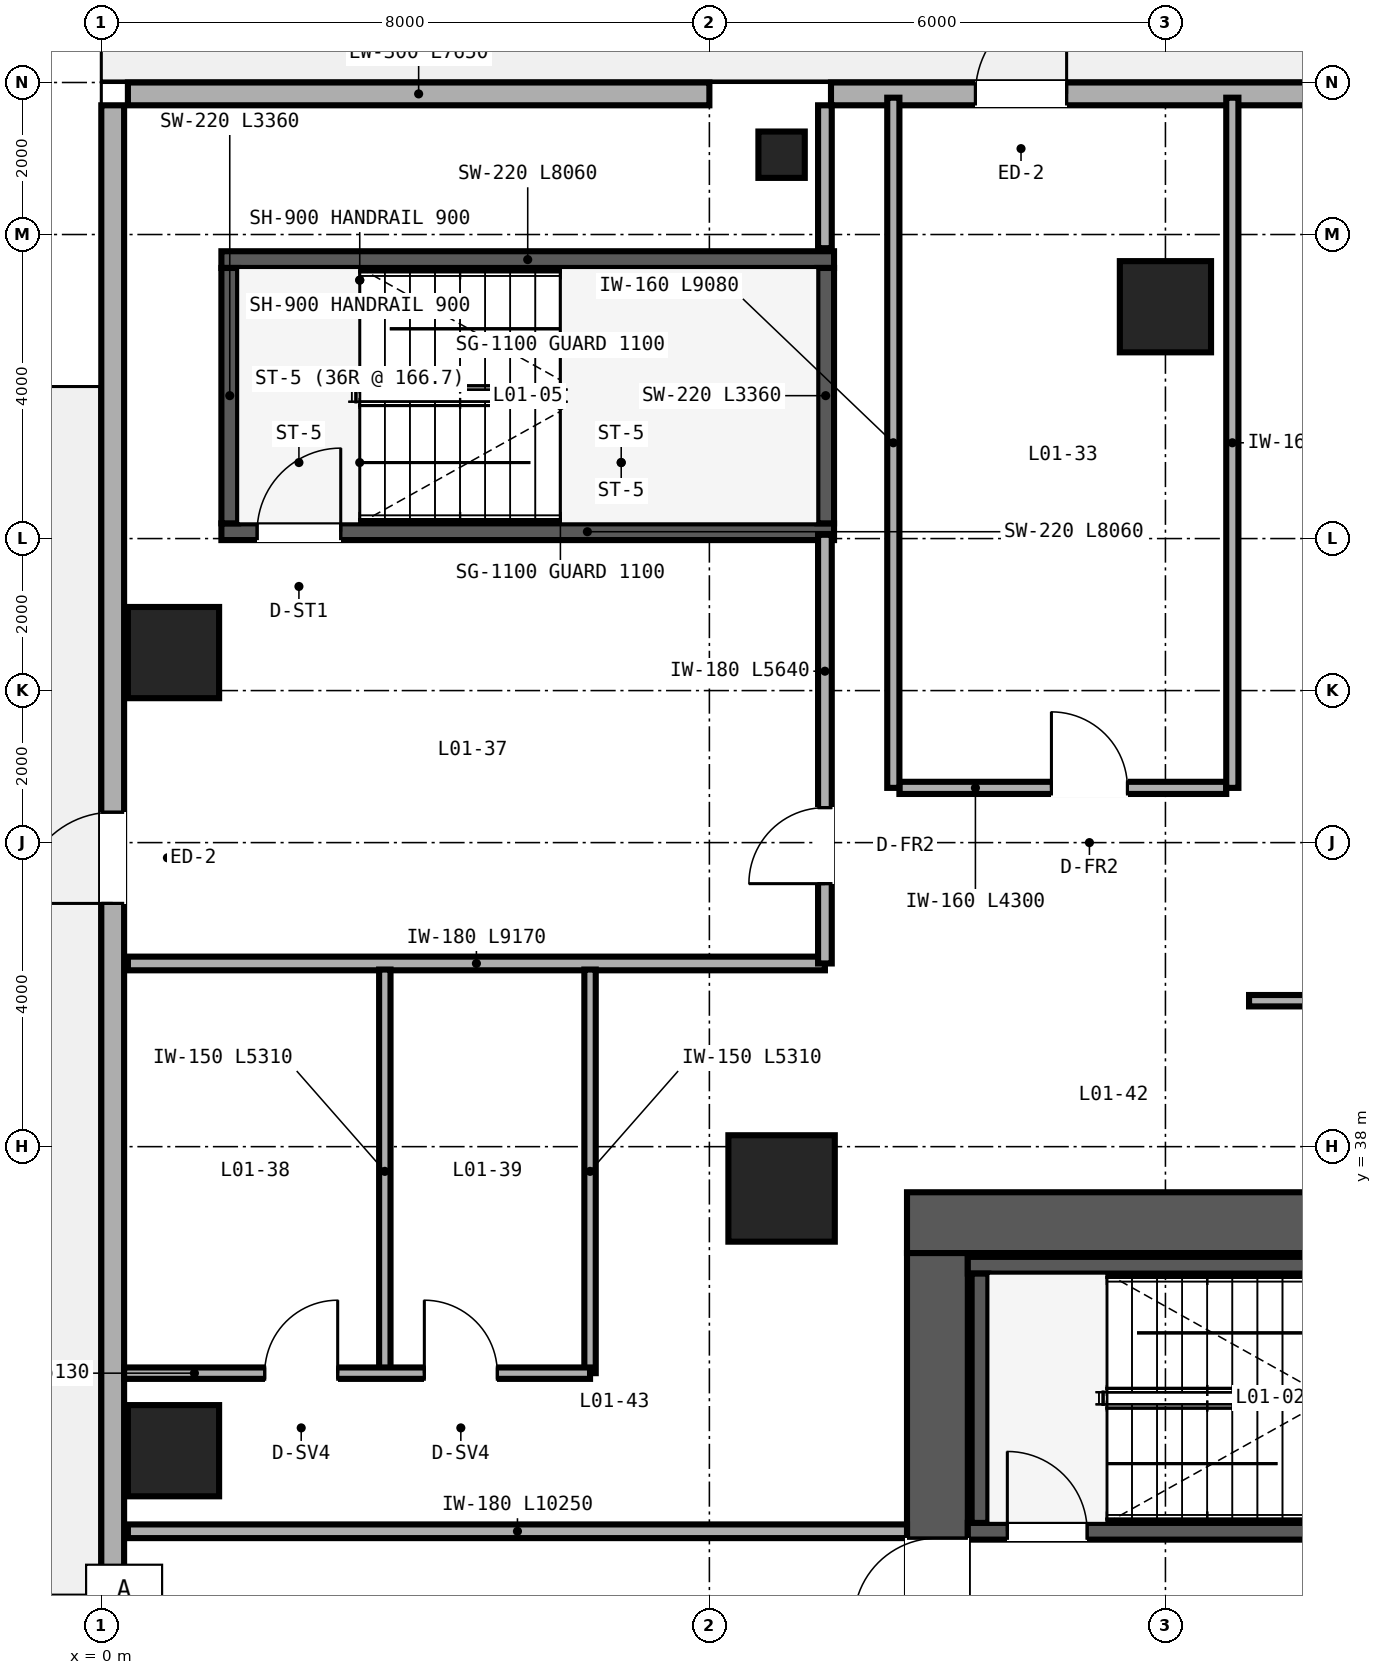
"""IFC4 building model, lengths in metres.
Left out: names, types, materials, properties, quantities, classifications, styles, units other than length and angle.
Written with IfcOpenShell. Run it as: python <this file> out.ifc"""

import sys

from ifc_helpers import new_model, si_unit, direction, frame, frame_2d, origin, origin_2d, place, context, subcontext, project, spatial, rectangle, hollow_circle, extrude, source, transform, mapped, element, fill, save


model = new_model("IFC4")
c1 = context("Model", 3, precision=1e-05, world=origin(), true_north=direction((0.0, 1.0)))
c2 = subcontext(c1, "Body", "Model", "MODEL_VIEW")
j1 = project(units=[si_unit("LENGTHUNIT", "METRE"), si_unit("PLANEANGLEUNIT", "RADIAN")], contexts=[c1])
p1 = place(None, origin())
s1 = spatial("IfcSite", under=j1, at=p1, CompositionType="ELEMENT")
p2 = place(p1, origin())
s2 = spatial("IfcBuilding", under=s1, at=p2, CompositionType="ELEMENT")
p3 = place(p2, origin())
s3 = spatial("IfcBuildingStorey", under=s2, at=p3, CompositionType="ELEMENT", Elevation=0.0)
p4 = place(p3, frame((10.6, 37.0, 0.0), z_axis=(0.0, 0.0, 1.0), x_axis=(1.0, 0.0, 0.0)))
e1 = element("IfcWall", 1, at=p4, inside=s3, PredefinedType="SHEAR", context=c2, shape_type="SweptSolid", body=[
    extrude(rectangle(XDim=12.8, YDim=0.8, at=frame_2d((6.4, 0.0))), origin(), (0.0, 0.0, 1.0), 5.71),
])
p5 = place(p4, frame((8.98, 0.0, 0.0)))
e2 = element("IfcOpeningElement", 2, at=p5, cuts=e1, PredefinedType="OPENING", context=c2, shape_type="SweptSolid", body=[
    extrude(rectangle(XDim=1.0, YDim=2.15, at=frame_2d((0.5, 1.075))), frame((0.0, 0.41, 0.0), z_axis=(0.0, -1.0, 0.0), x_axis=(1.0, 0.0, 0.0)), (0.0, 0.0, 1.0), 0.82),
])
p6 = place(p3, frame((11.0, 15.4, 0.0), z_axis=(0.0, 0.0, 1.0), x_axis=(0.0, 1.0, 0.0)))
e3 = element("IfcWall", 3, at=p6, inside=s3, PredefinedType="SHEAR", context=c2, shape_type="SweptSolid", body=[
    extrude(rectangle(XDim=21.2, YDim=0.8, at=frame_2d((10.6, 0.0))), origin(), (0.0, 0.0, 1.0), 5.71),
])
p7 = place(p6, frame((4.15, 0.0, 0.0)))
e4 = element("IfcOpeningElement", 4, at=p7, cuts=e3, PredefinedType="OPENING", context=c2, shape_type="SweptSolid", body=[
    extrude(rectangle(XDim=1.1, YDim=2.15, at=frame_2d((0.55, 1.075))), frame((0.0, 0.41, 0.0), z_axis=(0.0, -1.0, 0.0), x_axis=(1.0, 0.0, 0.0)), (0.0, 0.0, 1.0), 0.82),
])
p8 = place(p6, frame((16.35, 0.0, 0.0)))
e5 = element("IfcOpeningElement", 5, at=p8, cuts=e3, PredefinedType="OPENING", context=c2, shape_type="SweptSolid", body=[
    extrude(rectangle(XDim=1.1, YDim=2.15, at=frame_2d((0.55, 1.075))), frame((0.0, 0.41, 0.0), z_axis=(0.0, -1.0, 0.0), x_axis=(1.0, 0.0, 0.0)), (0.0, 0.0, 1.0), 0.82),
])
p9 = place(p3, frame((11.4, 32.94, 0.0), z_axis=(0.0, 0.0, 1.0), x_axis=(1.0, 0.0, 0.0)))
e6 = element("IfcWall", 6, at=p9, inside=s3, PredefinedType="SHEAR", context=c2, shape_type="SweptSolid", body=[
    extrude(rectangle(XDim=7.91, YDim=0.22, at=frame_2d((3.955, 0.0))), origin(), (0.0, 0.0, 1.0), 5.8),
])
p10 = place(p9, frame((0.52, 0.0, 0.0)))
e7 = element("IfcOpeningElement", 7, at=p10, cuts=e6, PredefinedType="OPENING", context=c2, shape_type="SweptSolid", body=[
    extrude(rectangle(XDim=1.05, YDim=2.15, at=frame_2d((0.525, 1.075))), frame((0.0, 0.12, 0.0), z_axis=(0.0, -1.0, 0.0), x_axis=(1.0, 0.0, 0.0)), (0.0, 0.0, 1.0), 0.24),
])
p11 = place(p3, frame((11.4, 36.44, 0.0), z_axis=(0.0, 0.0, 1.0), x_axis=(1.0, 0.0, 0.0)))
e8 = element("IfcWall", 8, at=p11, inside=s3, PredefinedType="SHEAR", context=c2, shape_type="SweptSolid", body=[
    extrude(rectangle(XDim=7.91, YDim=0.22, at=frame_2d((3.955, 0.0))), origin(), (0.0, 0.0, 1.0), 5.8),
])
p12 = place(p3, frame((11.56, 33.05, 0.0), z_axis=(0.0, 0.0, 1.0), x_axis=(0.0, 1.0, 0.0)))
e9 = element("IfcWall", 9, at=p12, inside=s3, PredefinedType="SHEAR", context=c2, shape_type="SweptSolid", body=[
    extrude(rectangle(XDim=3.28, YDim=0.22, at=frame_2d((1.64, 0.0))), origin(), (0.0, 0.0, 1.0), 5.8),
])
p13 = place(p3, frame((1.58, 46.09, 0.0), z_axis=(0.0, 0.0, 1.0), x_axis=(1.0, 0.0, 0.0)))
e10 = element("IfcWall", 10, at=p13, inside=s3, PredefinedType="SHEAR", context=c2, shape_type="SweptSolid", body=[
    extrude(rectangle(XDim=8.06, YDim=0.22, at=frame_2d((4.03, 0.0))), origin(), (0.0, 0.0, 1.0), 5.8),
])
p14 = place(p13, frame((0.47, 0.0, 0.0)))
e11 = element("IfcOpeningElement", 11, at=p14, cuts=e10, PredefinedType="OPENING", context=c2, shape_type="SweptSolid", body=[
    extrude(rectangle(XDim=1.1, YDim=2.15, at=frame_2d((0.55, 1.075))), frame((0.0, 0.12, 0.0), z_axis=(0.0, -1.0, 0.0), x_axis=(1.0, 0.0, 0.0)), (0.0, 0.0, 1.0), 0.24),
])
p15 = place(p3, frame((1.58, 49.67, 0.0), z_axis=(0.0, 0.0, 1.0), x_axis=(1.0, 0.0, 0.0)))
e12 = element("IfcWall", 12, at=p15, inside=s3, PredefinedType="SHEAR", context=c2, shape_type="SweptSolid", body=[
    extrude(rectangle(XDim=8.06, YDim=0.22, at=frame_2d((4.03, 0.0))), origin(), (0.0, 0.0, 1.0), 5.8),
])
for number, where, z_axis, x_axis in (
    (13, (1.69, 46.2, 0.0), (0.0, 0.0, 1.0), (0.0, 1.0, 0.0)),
    (14, (9.53, 46.2, 0.0), (0.0, 0.0, 1.0), (0.0, 1.0, 0.0)),
):
    element("IfcWall", number, at=place(p3, frame(where, z_axis=z_axis, x_axis=x_axis)), inside=s3, PredefinedType="SHEAR", context=c2, shape_type="SweptSolid", body=[
        extrude(rectangle(XDim=3.36, YDim=0.22, at=frame_2d((1.68, 0.0))), origin(), (0.0, 0.0, 1.0), 5.8),
    ])
m1 = source(origin(), c2, "Body", "SweptSolid", [
    extrude(rectangle(XDim=1.2, YDim=1.2, at=origin_2d()), origin(), (0.0, 0.0, 1.0), 5.71),
])
for number, where, z_axis, x_axis in (
    (15, (0.95, 34.0, 0.0), (0.0, 0.0, 1.0), (1.0, 0.0, 0.0)),
    (16, (0.95, 44.5, 0.0), (0.0, 0.0, 1.0), (1.0, 0.0, 0.0)),
):
    element("IfcColumn", number, at=place(p3, frame(where, z_axis=z_axis, x_axis=x_axis)), inside=s3, PredefinedType="COLUMN", context=c2, shape_type="MappedRepresentation", body=[
        mapped(m1, transform((0.0, 0.0, 0.0), scale=1.0)),
    ])
m2 = source(origin(), c2, "Body", "SweptSolid", [
    extrude(hollow_circle(Radius=0.305, WallThickness=0.025, at=origin_2d()), origin(), (0.0, 0.0, 1.0), 5.71),
])
p16 = place(p3, frame((8.95, 51.05, 0.0), z_axis=(0.0, 0.0, 1.0), x_axis=(1.0, 0.0, 0.0)))
e17 = element("IfcColumn", 17, at=p16, inside=s3, PredefinedType="COLUMN", context=c2, shape_type="MappedRepresentation", body=[
    mapped(m2, transform((0.0, 0.0, 0.0), scale=1.0)),
])
m3 = source(origin(), c2, "Body", "SweptSolid", [
    extrude(rectangle(XDim=1.4, YDim=1.4, at=origin_2d()), origin(), (0.0, 0.0, 1.0), 5.71),
])
p17 = place(p3, frame((8.95, 37.45, 0.0), z_axis=(0.0, 0.0, 1.0), x_axis=(1.0, 0.0, 0.0)))
e18 = element("IfcColumn", 18, at=p17, inside=s3, PredefinedType="COLUMN", context=c2, shape_type="MappedRepresentation", body=[
    mapped(m3, transform((0.0, 0.0, 0.0), scale=1.0)),
])
p18 = place(p3, frame((14.0, 49.05, 0.0), z_axis=(0.0, 0.0, 1.0), x_axis=(1.0, 0.0, 0.0)))
e19 = element("IfcColumn", 19, at=p18, inside=s3, PredefinedType="COLUMN", context=c2, shape_type="MappedRepresentation", body=[
    mapped(m1, transform((0.0, 0.0, 0.0), scale=1.0)),
])
p19 = place(p3, frame((0.15, 0.3, 0.0), z_axis=(0.0, 0.0, 1.0), x_axis=(0.0, 1.0, 0.0)))
e20 = element("IfcWall", 20, at=p19, inside=s3, PredefinedType="SOLIDWALL", context=c2, shape_type="SweptSolid", body=[
    extrude(rectangle(XDim=51.4, YDim=0.3, at=frame_2d((25.7, 0.0))), origin(), (0.0, 0.0, 1.0), 5.71),
])
p20 = place(p19, frame((19.4, 0.0, 0.0)))
e21 = element("IfcOpeningElement", 21, at=p20, cuts=e20, PredefinedType="OPENING", context=c2, shape_type="SweptSolid", body=[
    extrude(rectangle(XDim=1.2, YDim=2.2, at=frame_2d((0.6, 1.1))), frame((0.0, 0.16, 0.0), z_axis=(0.0, -1.0, 0.0), x_axis=(1.0, 0.0, 0.0)), (0.0, 0.0, 1.0), 0.32),
])
p21 = place(p19, frame((30.6, 0.0, 0.0)))
e22 = element("IfcOpeningElement", 22, at=p21, cuts=e20, PredefinedType="OPENING", context=c2, shape_type="SweptSolid", body=[
    extrude(rectangle(XDim=1.2, YDim=2.2, at=frame_2d((0.6, 1.1))), frame((0.0, 0.16, 0.0), z_axis=(0.0, -1.0, 0.0), x_axis=(1.0, 0.0, 0.0)), (0.0, 0.0, 1.0), 0.32),
])
p22 = place(p19, frame((40.9, 0.0, 0.0)))
e23 = element("IfcOpeningElement", 23, at=p22, cuts=e20, PredefinedType="OPENING", context=c2, shape_type="SweptSolid", body=[
    extrude(rectangle(XDim=1.2, YDim=2.2, at=frame_2d((0.6, 1.1))), frame((0.0, 0.16, 0.0), z_axis=(0.0, -1.0, 0.0), x_axis=(1.0, 0.0, 0.0)), (0.0, 0.0, 1.0), 0.32),
])
p23 = place(p3, frame((0.35, 51.85, 0.0), z_axis=(0.0, 0.0, 1.0), x_axis=(1.0, 0.0, 0.0)))
e24 = element("IfcWall", 24, at=p23, inside=s3, PredefinedType="SOLIDWALL", context=c2, shape_type="SweptSolid", body=[
    extrude(rectangle(XDim=7.65, YDim=0.3, at=frame_2d((3.825, 0.0))), origin(), (0.0, 0.0, 1.0), 5.71),
])
p24 = place(p3, frame((9.6, 51.85, 0.0), z_axis=(0.0, 0.0, 1.0), x_axis=(1.0, 0.0, 0.0)))
e25 = element("IfcWall", 25, at=p24, inside=s3, PredefinedType="SOLIDWALL", context=c2, shape_type="SweptSolid", body=[
    extrude(rectangle(XDim=13.2, YDim=0.3, at=frame_2d((6.6, 0.0))), origin(), (0.0, 0.0, 1.0), 5.71),
])
p25 = place(p24, frame((6.4, 0.0, 0.0)))
e26 = element("IfcOpeningElement", 26, at=p25, cuts=e25, PredefinedType="OPENING", context=c2, shape_type="SweptSolid", body=[
    extrude(rectangle(XDim=2.4, YDim=2.6, at=frame_2d((1.2, 1.3))), frame((0.0, 0.16, 0.0), z_axis=(0.0, -1.0, 0.0), x_axis=(1.0, 0.0, 0.0)), (0.0, 0.0, 1.0), 0.32),
])
p26 = place(p24, frame((1.9, 0.0, 0.0)))
e27 = element("IfcOpeningElement", 27, at=p26, cuts=e25, PredefinedType="OPENING", context=c2, shape_type="SweptSolid", body=[
    extrude(rectangle(XDim=1.2, YDim=2.2, at=frame_2d((0.6, 1.1))), frame((0.0, 0.16, 0.0), z_axis=(0.0, -1.0, 0.0), x_axis=(1.0, 0.0, 0.0)), (0.0, 0.0, 1.0), 0.32),
])
p27 = place(p3, frame((10.5, 42.72, 0.0), z_axis=(0.0, 0.0, 1.0), x_axis=(1.0, 0.0, 0.0)))
e28 = element("IfcWall", 28, at=p27, inside=s3, PredefinedType="PARTITIONING", context=c2, shape_type="SweptSolid", body=[
    extrude(rectangle(XDim=4.3, YDim=0.16, at=frame_2d((2.15, 0.0))), origin(), (0.0, 0.0, 1.0), 5.71),
])
p28 = place(p27, frame((2.0, 0.0, 0.0)))
e29 = element("IfcOpeningElement", 29, at=p28, cuts=e28, PredefinedType="OPENING", context=c2, shape_type="SweptSolid", body=[
    extrude(rectangle(XDim=1.0, YDim=2.15, at=frame_2d((0.5, 1.075))), frame((0.0, 0.09, 0.0), z_axis=(0.0, -1.0, 0.0), x_axis=(1.0, 0.0, 0.0)), (0.0, 0.0, 1.0), 0.18),
])
for number, where, z_axis, x_axis in (
    (30, (10.42, 42.72, 0.0), (0.0, 0.0, 1.0), (0.0, 1.0, 0.0)),
    (31, (14.88, 42.72, 0.0), (0.0, 0.0, 1.0), (0.0, 1.0, 0.0)),
):
    element("IfcWall", number, at=place(p3, frame(where, z_axis=z_axis, x_axis=x_axis)), inside=s3, PredefinedType="PARTITIONING", context=c2, shape_type="SweptSolid", body=[
        extrude(rectangle(XDim=9.08, YDim=0.16, at=frame_2d((4.54, 0.0))), origin(), (0.0, 0.0, 1.0), 4.783),
    ])
p29 = place(p3, frame((15.1, 39.92, 0.0), z_axis=(0.0, 0.0, 1.0), x_axis=(1.0, 0.0, 0.0)))
e32 = element("IfcWall", 32, at=p29, inside=s3, PredefinedType="PARTITIONING", context=c2, shape_type="SweptSolid", body=[
    extrude(rectangle(XDim=4.5, YDim=0.15, at=frame_2d((2.25, 0.0))), origin(), (0.0, 0.0, 1.0), 5.71),
])
p30 = place(p29, frame((1.5, 0.0, 0.0)))
e33 = element("IfcOpeningElement", 33, at=p30, cuts=e32, PredefinedType="OPENING", context=c2, shape_type="SweptSolid", body=[
    extrude(rectangle(XDim=1.1, YDim=2.15, at=frame_2d((0.55, 1.075))), frame((0.0, 0.085, 0.0), z_axis=(0.0, -1.0, 0.0), x_axis=(1.0, 0.0, 0.0)), (0.0, 0.0, 1.0), 0.17),
])
p31 = place(p3, frame((0.35, 32.94, 0.0), z_axis=(0.0, 0.0, 1.0), x_axis=(1.0, 0.0, 0.0)))
e34 = element("IfcWall", 34, at=p31, inside=s3, PredefinedType="SOLIDWALL", context=c2, shape_type="SweptSolid", body=[
    extrude(rectangle(XDim=10.25, YDim=0.18, at=frame_2d((5.125, 0.0))), origin(), (0.0, 0.0, 1.0), 4.931),
])
p32 = place(p3, frame((0.35, 40.41, 0.0), z_axis=(0.0, 0.0, 1.0), x_axis=(1.0, 0.0, 0.0)))
e35 = element("IfcWall", 35, at=p32, inside=s3, PredefinedType="SOLIDWALL", context=c2, shape_type="SweptSolid", body=[
    extrude(rectangle(XDim=9.17, YDim=0.18, at=frame_2d((4.585, 0.0))), origin(), (0.0, 0.0, 1.0), 4.931),
])
p33 = place(p3, frame((9.52, 40.41, 0.0), z_axis=(0.0, 0.0, 1.0), x_axis=(0.0, 1.0, 0.0)))
e36 = element("IfcWall", 36, at=p33, inside=s3, PredefinedType="SOLIDWALL", context=c2, shape_type="SweptSolid", body=[
    extrude(rectangle(XDim=5.64, YDim=0.18, at=frame_2d((2.82, 0.0))), origin(), (0.0, 0.0, 1.0), 5.71),
])
p34 = place(p33, frame((1.05, 0.0, 0.0)))
e37 = element("IfcOpeningElement", 37, at=p34, cuts=e36, PredefinedType="OPENING", context=c2, shape_type="SweptSolid", body=[
    extrude(rectangle(XDim=1.0, YDim=2.15, at=frame_2d((0.5, 1.075))), frame((0.0, 0.1, 0.0), z_axis=(0.0, -1.0, 0.0), x_axis=(1.0, 0.0, 0.0)), (0.0, 0.0, 1.0), 0.2),
])
p35 = place(p3, frame((9.52, 49.82, 0.0), z_axis=(0.0, 0.0, 1.0), x_axis=(0.0, 1.0, 0.0)))
e38 = element("IfcWall", 38, at=p35, inside=s3, PredefinedType="SOLIDWALL", context=c2, shape_type="SweptSolid", body=[
    extrude(rectangle(XDim=1.88, YDim=0.18, at=frame_2d((0.94, 0.0))), origin(), (0.0, 0.0, 1.0), 4.783),
])
for number, where, z_axis, x_axis in (
    (39, (3.73, 35.02, 0.0), (0.0, 0.0, 1.0), (0.0, 1.0, 0.0)),
    (40, (6.43, 35.02, 0.0), (0.0, 0.0, 1.0), (0.0, 1.0, 0.0)),
):
    element("IfcWall", number, at=place(p3, frame(where, z_axis=z_axis, x_axis=x_axis)), inside=s3, PredefinedType="PARTITIONING", context=c2, shape_type="SweptSolid", body=[
        extrude(rectangle(XDim=5.31, YDim=0.15, at=frame_2d((2.655, 0.0))), origin(), (0.0, 0.0, 1.0), 5.71),
    ])
p36 = place(p3, frame((0.3, 35.02, 0.0), z_axis=(0.0, 0.0, 1.0), x_axis=(1.0, 0.0, 0.0)))
e41 = element("IfcWall", 41, at=p36, inside=s3, PredefinedType="PARTITIONING", context=c2, shape_type="SweptSolid", body=[
    extrude(rectangle(XDim=6.13, YDim=0.15, at=frame_2d((3.065, 0.0))), origin(), (0.0, 0.0, 1.0), 4.931),
])
p37 = place(p36, frame((1.85, 0.0, 0.0)))
e42 = element("IfcOpeningElement", 42, at=p37, cuts=e41, PredefinedType="OPENING", context=c2, shape_type="SweptSolid", body=[
    extrude(rectangle(XDim=0.96, YDim=2.15, at=frame_2d((0.48, 1.075))), frame((0.0, 0.085, 0.0), z_axis=(0.0, -1.0, 0.0), x_axis=(1.0, 0.0, 0.0)), (0.0, 0.0, 1.0), 0.17),
])
p38 = place(p36, frame((3.95, 0.0, 0.0)))
e43 = element("IfcOpeningElement", 43, at=p38, cuts=e41, PredefinedType="OPENING", context=c2, shape_type="SweptSolid", body=[
    extrude(rectangle(XDim=0.96, YDim=2.15, at=frame_2d((0.48, 1.075))), frame((0.0, 0.085, 0.0), z_axis=(0.0, -1.0, 0.0), x_axis=(1.0, 0.0, 0.0)), (0.0, 0.0, 1.0), 0.17),
])
m4 = source(origin(), c2, "Body", "SweptSolid", [
    extrude(rectangle(XDim=1.2, YDim=2.2, at=frame_2d((0.6, 1.1))), frame((0.0, 0.025, 0.0), z_axis=(0.0, -1.0, 0.0), x_axis=(1.0, 0.0, 0.0)), (0.0, 0.0, 1.0), 0.05),
])
p39 = place(p26, origin())
e44 = element("IfcDoor", 44, at=p39, inside=s3, OperationType="SINGLE_SWING_RIGHT", PredefinedType="DOOR", context=c2, shape_type="MappedRepresentation", body=[
    mapped(m4, transform((0.0, 0.0, 0.0), scale=1.0)),
])
fill(e27, e44)
p40 = place(p21, origin())
e45 = element("IfcDoor", 45, at=p40, inside=s3, OperationType="SINGLE_SWING_RIGHT", PredefinedType="DOOR", context=c2, shape_type="MappedRepresentation", body=[
    mapped(m4, transform((0.0, 0.0, 0.0), scale=1.0)),
])
fill(e22, e45)
p41 = place(p22, origin())
e46 = element("IfcDoor", 46, at=p41, inside=s3, OperationType="SINGLE_SWING_LEFT", PredefinedType="DOOR", context=c2, shape_type="MappedRepresentation", body=[
    mapped(m4, transform((0.0, 0.0, 0.0), scale=1.0)),
])
fill(e23, e46)
m5 = source(origin(), c2, "Body", "SweptSolid", [
    extrude(rectangle(XDim=1.05, YDim=2.15, at=frame_2d((0.525, 1.075))), frame((0.0, 0.025, 0.0), z_axis=(0.0, -1.0, 0.0), x_axis=(1.0, 0.0, 0.0)), (0.0, 0.0, 1.0), 0.05),
])
p42 = place(p10, origin())
e47 = element("IfcDoor", 47, at=p42, inside=s3, OperationType="SINGLE_SWING_LEFT", PredefinedType="DOOR", context=c2, shape_type="MappedRepresentation", body=[
    mapped(m5, transform((0.0, 0.0, 0.0), scale=1.0)),
])
fill(e7, e47)
m6 = source(origin(), c2, "Body", "SweptSolid", [
    extrude(rectangle(XDim=1.1, YDim=2.15, at=frame_2d((0.55, 1.075))), frame((0.0, 0.025, 0.0), z_axis=(0.0, -1.0, 0.0), x_axis=(1.0, 0.0, 0.0)), (0.0, 0.0, 1.0), 0.05),
])
p43 = place(p14, origin())
e48 = element("IfcDoor", 48, at=p43, inside=s3, OperationType="SINGLE_SWING_RIGHT", PredefinedType="DOOR", context=c2, shape_type="MappedRepresentation", body=[
    mapped(m6, transform((0.0, 0.0, 0.0), scale=1.0)),
])
fill(e11, e48)
p44 = place(p8, origin())
e49 = element("IfcDoor", 49, at=p44, inside=s3, OperationType="SINGLE_SWING_LEFT", PredefinedType="DOOR", context=c2, shape_type="MappedRepresentation", body=[
    mapped(m6, transform((0.0, 0.0, 0.0), scale=1.0)),
])
fill(e5, e49)
m7 = source(origin(), c2, "Body", "SweptSolid", [
    extrude(rectangle(XDim=1.0, YDim=2.15, at=frame_2d((0.5, 1.075))), frame((0.0, 0.025, 0.0), z_axis=(0.0, -1.0, 0.0), x_axis=(1.0, 0.0, 0.0)), (0.0, 0.0, 1.0), 0.05),
])
p45 = place(p28, origin())
e50 = element("IfcDoor", 50, at=p45, inside=s3, OperationType="SINGLE_SWING_LEFT", PredefinedType="DOOR", context=c2, shape_type="MappedRepresentation", body=[
    mapped(m7, transform((0.0, 0.0, 0.0), scale=1.0)),
])
fill(e29, e50)
p46 = place(p34, origin())
e51 = element("IfcDoor", 51, at=p46, inside=s3, OperationType="SINGLE_SWING_LEFT", PredefinedType="DOOR", context=c2, shape_type="MappedRepresentation", body=[
    mapped(m7, transform((0.0, 0.0, 0.0), scale=1.0)),
])
fill(e37, e51)
m8 = source(origin(), c2, "Body", "SweptSolid", [
    extrude(rectangle(XDim=0.96, YDim=2.15, at=frame_2d((0.48, 1.075))), frame((0.0, 0.025, 0.0), z_axis=(0.0, -1.0, 0.0), x_axis=(1.0, 0.0, 0.0)), (0.0, 0.0, 1.0), 0.05),
])
p47 = place(p37, origin())
e52 = element("IfcDoor", 52, at=p47, inside=s3, OperationType="SINGLE_SWING_RIGHT", PredefinedType="DOOR", context=c2, shape_type="MappedRepresentation", body=[
    mapped(m8, transform((0.0, 0.0, 0.0), scale=1.0)),
])
fill(e42, e52)
p48 = place(p38, origin())
e53 = element("IfcDoor", 53, at=p48, inside=s3, OperationType="SINGLE_SWING_LEFT", PredefinedType="DOOR", context=c2, shape_type="MappedRepresentation", body=[
    mapped(m8, transform((0.0, 0.0, 0.0), scale=1.0)),
])
fill(e43, e53)
save(model, sys.argv[1])
